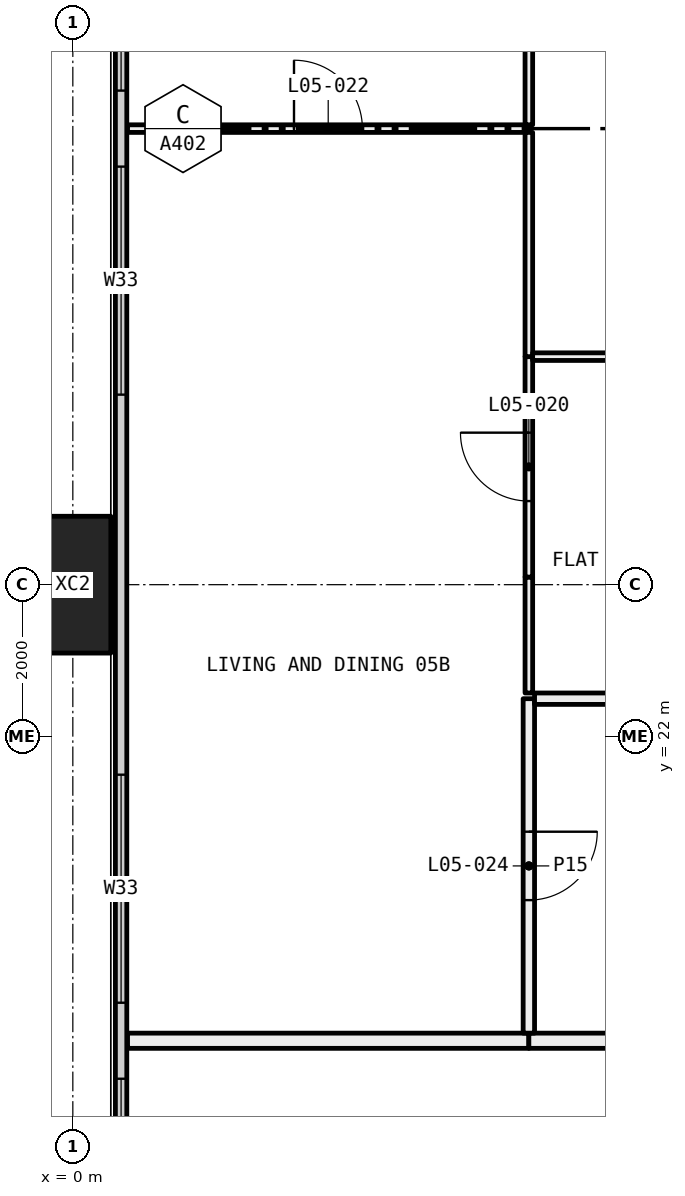
"""IFC4 building model, lengths in metres.
Left out: names, types, materials, properties, quantities, classifications, styles, units other than length and angle.
Written with IfcOpenShell. Run it as: python <this file> out.ifc"""

import sys

from ifc_helpers import new_model, si_unit, direction, frame, frame_2d, origin, origin_2d, place, context, subcontext, project, spatial, rectangle, hollow_rectangle, extrude, element, fill, save


model = new_model("IFC4")
c1 = context("Model", 3, precision=1e-05, world=origin(), true_north=direction((0.0, 1.0)))
c2 = subcontext(c1, "Body", "Model", "MODEL_VIEW")
j1 = project(units=[si_unit("LENGTHUNIT", "METRE"), si_unit("PLANEANGLEUNIT", "RADIAN")], contexts=[c1])
p1 = place(None, origin())
s1 = spatial("IfcSite", under=j1, at=p1, CompositionType="ELEMENT")
p2 = place(p1, origin())
s2 = spatial("IfcBuilding", under=s1, at=p2, CompositionType="ELEMENT")
p3 = place(p2, frame((0.0, 0.0, 30.0)))
s3 = spatial("IfcBuildingStorey", under=s2, at=p3, CompositionType="ELEMENT", Elevation=30.0)
p4 = place(p3, frame((0.0, 24.0, -0.4), z_axis=(0.0, 0.0, 1.0), x_axis=(0.0, 1.0, 0.0)))
e1 = element("IfcColumn", 1, at=p4, inside=s3, PredefinedType="COLUMN", context=c2, shape_type="SweptSolid", body=[
    extrude(hollow_rectangle(XDim=1.8, YDim=1.0, WallThickness=0.07, at=origin_2d()), origin(), (0.0, 0.0, 1.0), 3.45),
])
p5 = place(p3, frame((0.635, 6.71, 0.0), z_axis=(0.0, 0.0, 1.0), x_axis=(0.0, 1.0, 0.0)))
e2 = element("IfcWall", 2, at=p5, inside=s3, PredefinedType="ELEMENTEDWALL", context=c2, shape_type="SweptSolid", body=[
    extrude(rectangle(XDim=34.58, YDim=0.15, at=frame_2d((17.29, 0.0))), origin(), (0.0, 0.0, 1.0), 3.05),
])
p6 = place(p5, frame((0.29, 0.0, 0.45)))
e3 = element("IfcOpeningElement", 3, at=p6, cuts=e2, PredefinedType="OPENING", context=c2, shape_type="SweptSolid", body=[
    extrude(rectangle(XDim=4.5, YDim=2.55, at=frame_2d((2.25, 1.275))), frame((0.0, 0.085, 0.0), z_axis=(0.0, -1.0, 0.0), x_axis=(1.0, 0.0, 0.0)), (0.0, 0.0, 1.0), 0.17),
])
p7 = place(p5, frame((7.79, 0.0, 0.45)))
e4 = element("IfcOpeningElement", 4, at=p7, cuts=e2, PredefinedType="OPENING", context=c2, shape_type="SweptSolid", body=[
    extrude(rectangle(XDim=3.0, YDim=2.55, at=frame_2d((1.5, 1.275))), frame((0.0, 0.085, 0.0), z_axis=(0.0, -1.0, 0.0), x_axis=(1.0, 0.0, 0.0)), (0.0, 0.0, 1.0), 0.17),
])
p8 = place(p5, frame((11.79, 0.0, 0.45)))
e5 = element("IfcOpeningElement", 5, at=p8, cuts=e2, PredefinedType="OPENING", context=c2, shape_type="SweptSolid", body=[
    extrude(rectangle(XDim=3.0, YDim=2.55, at=frame_2d((1.5, 1.275))), frame((0.0, 0.085, 0.0), z_axis=(0.0, -1.0, 0.0), x_axis=(1.0, 0.0, 0.0)), (0.0, 0.0, 1.0), 0.17),
])
p9 = place(p5, frame((19.79, 0.0, 0.45)))
e6 = element("IfcOpeningElement", 6, at=p9, cuts=e2, PredefinedType="OPENING", context=c2, shape_type="SweptSolid", body=[
    extrude(rectangle(XDim=3.0, YDim=2.55, at=frame_2d((1.5, 1.275))), frame((0.0, 0.085, 0.0), z_axis=(0.0, -1.0, 0.0), x_axis=(1.0, 0.0, 0.0)), (0.0, 0.0, 1.0), 0.17),
])
p10 = place(p5, frame((23.79, 0.0, 0.45)))
e7 = element("IfcOpeningElement", 7, at=p10, cuts=e2, PredefinedType="OPENING", context=c2, shape_type="SweptSolid", body=[
    extrude(rectangle(XDim=2.0, YDim=2.55, at=frame_2d((1.0, 1.275))), frame((0.0, 0.085, 0.0), z_axis=(0.0, -1.0, 0.0), x_axis=(1.0, 0.0, 0.0)), (0.0, 0.0, 1.0), 0.17),
])
p11 = place(p5, frame((29.79, 0.0, 0.45)))
e8 = element("IfcOpeningElement", 8, at=p11, cuts=e2, PredefinedType="OPENING", context=c2, shape_type="SweptSolid", body=[
    extrude(rectangle(XDim=4.5, YDim=2.55, at=frame_2d((2.25, 1.275))), frame((0.0, 0.085, 0.0), z_axis=(0.0, -1.0, 0.0), x_axis=(1.0, 0.0, 0.0)), (0.0, 0.0, 1.0), 0.17),
])
p12 = place(p3, frame((6.0, 18.0, 0.0), z_axis=(0.0, 0.0, 1.0), x_axis=(-1.0, 0.0, 0.0)))
e9 = element("IfcWall", 9, at=p12, inside=s3, PredefinedType="PARTITIONING", context=c2, shape_type="SweptSolid", body=[
    extrude(rectangle(XDim=5.28, YDim=0.2, at=frame_2d((2.64, 0.0))), origin(), (0.0, 0.0, 1.0), 3.05),
])
p13 = place(p3, frame((10.1, 18.0, 0.0), z_axis=(0.0, 0.0, 1.0), x_axis=(-1.0, 0.0, 0.0)))
e10 = element("IfcWall", 10, at=p13, inside=s3, PredefinedType="PARTITIONING", context=c2, shape_type="SweptSolid", body=[
    extrude(rectangle(XDim=4.1, YDim=0.2, at=frame_2d((2.05, 0.0))), origin(), (0.0, 0.0, 1.0), 3.05),
])
p14 = place(p3, frame((6.0, 30.0, 0.0), z_axis=(0.0, 0.0, 1.0), x_axis=(-1.0, 0.0, 0.0)))
e11 = element("IfcWall", 11, at=p14, inside=s3, PredefinedType="PARTITIONING", context=c2, shape_type="SweptSolid", body=[
    extrude(rectangle(XDim=5.28, YDim=0.1, at=frame_2d((2.64, 0.0))), origin(), (0.0, 0.0, 1.0), 3.05),
])
p15 = place(p14, frame((2.19, 0.0, 0.0)))
e12 = element("IfcOpeningElement", 12, at=p15, cuts=e11, PredefinedType="OPENING", context=c2, shape_type="SweptSolid", body=[
    extrude(rectangle(XDim=0.9, YDim=2.1, at=frame_2d((0.45, 1.05))), frame((0.0, 0.06, 0.0), z_axis=(0.0, -1.0, 0.0), x_axis=(1.0, 0.0, 0.0)), (0.0, 0.0, 1.0), 0.12),
])
p16 = place(p3, frame((6.0, 18.1, 0.0), z_axis=(0.0, 0.0, 1.0), x_axis=(0.0, 1.0, 0.0)))
e13 = element("IfcWall", 13, at=p16, inside=s3, PredefinedType="PARTITIONING", context=c2, shape_type="SweptSolid", body=[
    extrude(rectangle(XDim=4.4, YDim=0.15, at=frame_2d((2.2, 0.0))), origin(), (0.0, 0.0, 1.0), 3.05),
])
p17 = place(p16, frame((1.75, 0.0, 0.0)))
e14 = element("IfcOpeningElement", 14, at=p17, cuts=e13, PredefinedType="OPENING", context=c2, shape_type="SweptSolid", body=[
    extrude(rectangle(XDim=0.9, YDim=2.1, at=frame_2d((0.45, 1.05))), frame((0.0, 0.085, 0.0), z_axis=(0.0, -1.0, 0.0), x_axis=(1.0, 0.0, 0.0)), (0.0, 0.0, 1.0), 0.17),
])
p18 = place(p3, frame((6.0, 22.575, 0.0), z_axis=(0.0, 0.0, 1.0), x_axis=(0.0, 1.0, 0.0)))
e15 = element("IfcWall", 15, at=p18, inside=s3, PredefinedType="PARTITIONING", context=c2, shape_type="SweptSolid", body=[
    extrude(rectangle(XDim=1.525, YDim=0.1, at=frame_2d((0.763, 0.0))), origin(), (0.0, 0.0, 1.0), 2.45),
])
p19 = place(p3, frame((6.0, 24.1, 0.0), z_axis=(0.0, 0.0, 1.0), x_axis=(0.0, 1.0, 0.0)))
e16 = element("IfcWall", 16, at=p19, inside=s3, PredefinedType="PARTITIONING", context=c2, shape_type="SweptSolid", body=[
    extrude(rectangle(XDim=2.9, YDim=0.1, at=frame_2d((1.45, 0.0))), origin(), (0.0, 0.0, 1.0), 3.05),
])
p20 = place(p19, frame((1.0, 0.0, 0.0)))
e17 = element("IfcOpeningElement", 17, at=p20, cuts=e16, PredefinedType="OPENING", context=c2, shape_type="SweptSolid", body=[
    extrude(rectangle(XDim=0.9, YDim=2.1, at=frame_2d((0.45, 1.05))), frame((0.0, 0.06, 0.0), z_axis=(0.0, -1.0, 0.0), x_axis=(1.0, 0.0, 0.0)), (0.0, 0.0, 1.0), 0.12),
])
p21 = place(p3, frame((6.0, 27.0, 0.0), z_axis=(0.0, 0.0, 1.0), x_axis=(0.0, 1.0, 0.0)))
e18 = element("IfcWall", 18, at=p21, inside=s3, PredefinedType="PARTITIONING", context=c2, shape_type="SweptSolid", body=[
    extrude(rectangle(XDim=2.95, YDim=0.1, at=frame_2d((1.475, 0.0))), origin(), (0.0, 0.0, 1.0), 3.05),
])
p22 = place(p3, frame((6.0, 30.05, 0.0), z_axis=(0.0, 0.0, 1.0), x_axis=(0.0, 1.0, 0.0)))
e19 = element("IfcWall", 19, at=p22, inside=s3, PredefinedType="PARTITIONING", context=c2, shape_type="SweptSolid", body=[
    extrude(rectangle(XDim=5.9, YDim=0.1, at=frame_2d((2.95, 0.0))), origin(), (0.0, 0.0, 1.0), 2.45),
])
p23 = place(p3, frame((10.0, 22.5, 0.0), z_axis=(0.0, 0.0, 1.0), x_axis=(-1.0, 0.0, 0.0)))
e20 = element("IfcWall", 20, at=p23, inside=s3, PredefinedType="PARTITIONING", context=c2, shape_type="SweptSolid", body=[
    extrude(rectangle(XDim=3.925, YDim=0.15, at=frame_2d((1.962, 0.0))), origin(), (0.0, 0.0, 1.0), 3.05),
])
p24 = place(p3, frame((10.0, 27.0, 0.0), z_axis=(0.0, 0.0, 1.0), x_axis=(-1.0, 0.0, 0.0)))
e21 = element("IfcWall", 21, at=p24, inside=s3, PredefinedType="PARTITIONING", context=c2, shape_type="SweptSolid", body=[
    extrude(rectangle(XDim=3.95, YDim=0.1, at=frame_2d((1.975, 0.0))), origin(), (0.0, 0.0, 1.0), 3.05),
])
p25 = place(p24, frame((1.525, 0.0, 0.0)))
e22 = element("IfcOpeningElement", 22, at=p25, cuts=e21, PredefinedType="OPENING", context=c2, shape_type="SweptSolid", body=[
    extrude(rectangle(XDim=0.9, YDim=2.1, at=frame_2d((0.45, 1.05))), frame((0.0, 0.06, 0.0), z_axis=(0.0, -1.0, 0.0), x_axis=(1.0, 0.0, 0.0)), (0.0, 0.0, 1.0), 0.12),
])
p26 = place(p7, origin())
e23 = element("IfcWindow", 23, at=p26, inside=s3, PartitioningType="SINGLE_PANEL", PredefinedType="WINDOW", context=c2, shape_type="SweptSolid", body=[
    extrude(rectangle(XDim=3.0, YDim=2.55, at=frame_2d((1.5, 1.275))), frame((0.0, 0.03, 0.0), z_axis=(0.0, -1.0, 0.0), x_axis=(1.0, 0.0, 0.0)), (0.0, 0.0, 1.0), 0.06),
])
fill(e4, e23)
p27 = place(p8, origin())
e24 = element("IfcWindow", 24, at=p27, inside=s3, PartitioningType="SINGLE_PANEL", PredefinedType="WINDOW", context=c2, shape_type="SweptSolid", body=[
    extrude(rectangle(XDim=3.0, YDim=2.55, at=frame_2d((1.5, 1.275))), frame((0.0, 0.03, 0.0), z_axis=(0.0, -1.0, 0.0), x_axis=(1.0, 0.0, 0.0)), (0.0, 0.0, 1.0), 0.06),
])
fill(e5, e24)
p28 = place(p9, origin())
e25 = element("IfcWindow", 25, at=p28, inside=s3, PartitioningType="SINGLE_PANEL", PredefinedType="WINDOW", context=c2, shape_type="SweptSolid", body=[
    extrude(rectangle(XDim=3.0, YDim=2.55, at=frame_2d((1.5, 1.275))), frame((0.0, 0.03, 0.0), z_axis=(0.0, -1.0, 0.0), x_axis=(1.0, 0.0, 0.0)), (0.0, 0.0, 1.0), 0.06),
])
fill(e6, e25)
p29 = place(p10, origin())
e26 = element("IfcWindow", 26, at=p29, inside=s3, PartitioningType="SINGLE_PANEL", PredefinedType="WINDOW", context=c2, shape_type="SweptSolid", body=[
    extrude(rectangle(XDim=2.0, YDim=2.55, at=frame_2d((1.0, 1.275))), frame((0.0, 0.03, 0.0), z_axis=(0.0, -1.0, 0.0), x_axis=(1.0, 0.0, 0.0)), (0.0, 0.0, 1.0), 0.06),
])
fill(e7, e26)
p30 = place(p20, origin())
e27 = element("IfcDoor", 27, at=p30, inside=s3, OperationType="SINGLE_SWING_LEFT", PredefinedType="DOOR", context=c2, shape_type="SweptSolid", body=[
    extrude(rectangle(XDim=0.9, YDim=2.1, at=frame_2d((0.45, 1.05))), frame((0.0, 0.025, 0.0), z_axis=(0.0, -1.0, 0.0), x_axis=(1.0, 0.0, 0.0)), (0.0, 0.0, 1.0), 0.05),
])
fill(e17, e27)
p31 = place(p15, frame((0.9, 0.0, 0.0), x_axis=(-1.0, 0.0, 0.0)))
e28 = element("IfcDoor", 28, at=p31, inside=s3, OperationType="SINGLE_SWING_RIGHT", PredefinedType="DOOR", context=c2, shape_type="SweptSolid", body=[
    extrude(rectangle(XDim=0.9, YDim=2.1, at=frame_2d((0.45, 1.05))), frame((0.0, 0.025, 0.0), z_axis=(0.0, -1.0, 0.0), x_axis=(1.0, 0.0, 0.0)), (0.0, 0.0, 1.0), 0.05),
])
fill(e12, e28)
p32 = place(p17, frame((0.9, 0.0, 0.0), x_axis=(-1.0, 0.0, 0.0)))
e29 = element("IfcDoor", 29, at=p32, inside=s3, OperationType="SINGLE_SWING_RIGHT", PredefinedType="DOOR", context=c2, shape_type="SweptSolid", body=[
    extrude(rectangle(XDim=0.9, YDim=2.1, at=frame_2d((0.45, 1.05))), frame((0.0, 0.025, 0.0), z_axis=(0.0, -1.0, 0.0), x_axis=(1.0, 0.0, 0.0)), (0.0, 0.0, 1.0), 0.05),
])
fill(e14, e29)
save(model, sys.argv[1])
